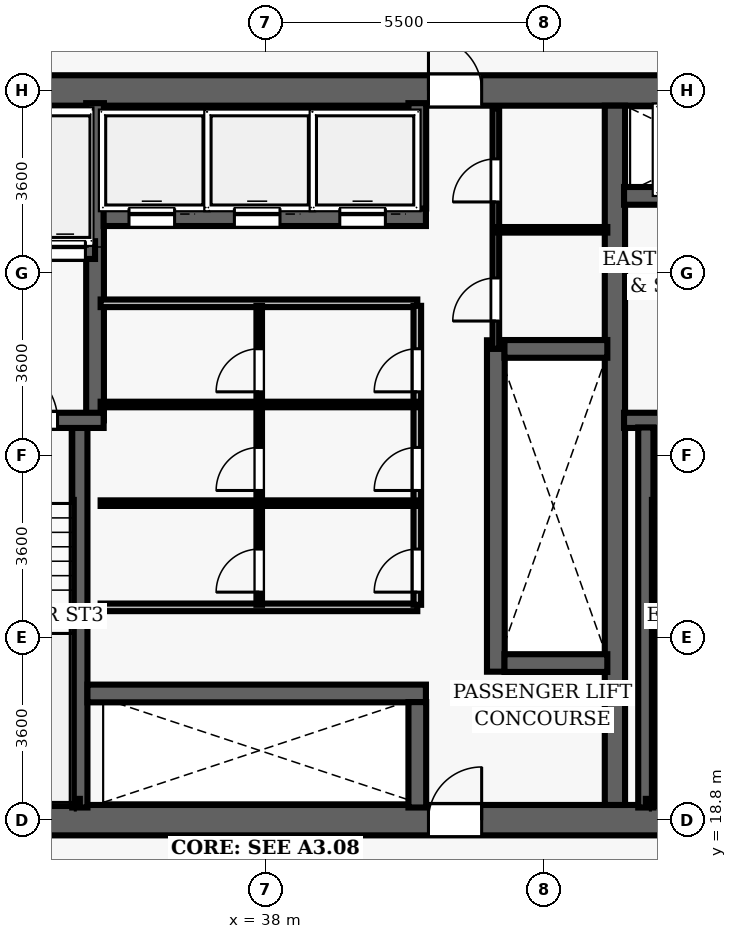
"""IFC4 building model, lengths in metres.
Left out: names, types, materials, properties, quantities, classifications, styles, units other than length and angle.
Written with IfcOpenShell. Run it as: python <this file> out.ifc"""

import sys

from ifc_helpers import new_model, si_unit, direction, frame, frame_2d, origin, place, context, subcontext, project, spatial, rectangle, extrude, element, fill, save


model = new_model("IFC4")
c1 = context("Model", 3, precision=1e-05, world=origin(), true_north=direction((0.0, 1.0)))
c2 = subcontext(c1, "Body", "Model", "MODEL_VIEW")
j1 = project(units=[si_unit("LENGTHUNIT", "METRE"), si_unit("PLANEANGLEUNIT", "RADIAN")], contexts=[c1])
p1 = place(None, origin())
s1 = spatial("IfcSite", under=j1, at=p1, CompositionType="ELEMENT")
p2 = place(p1, origin())
s2 = spatial("IfcBuilding", under=s1, at=p2, CompositionType="ELEMENT")
p3 = place(p2, frame((0.0, 0.0, 65.9)))
s3 = spatial("IfcBuildingStorey", under=s2, at=p3, CompositionType="ELEMENT", Elevation=65.9)
p4 = place(p3, frame((26.7, 18.8, 0.0), z_axis=(0.0, 0.0, 1.0), x_axis=(1.0, 0.0, 0.0)))
e1 = element("IfcWall", 1, at=p4, inside=s3, PredefinedType="SHEAR", context=c2, shape_type="SweptSolid", body=[
    extrude(rectangle(XDim=22.6, YDim=0.6, at=frame_2d((11.3, 0.0))), origin(), (0.0, 0.0, 1.0), 3.5),
])
p5 = place(p4, frame((14.52, 0.0, 0.0)))
e2 = element("IfcOpeningElement", 2, at=p5, cuts=e1, PredefinedType="OPENING", context=c2, shape_type="SweptSolid", body=[
    extrude(rectangle(XDim=1.05, YDim=2.15, at=frame_2d((0.525, 1.075))), frame((0.0, 0.31, 0.0), z_axis=(0.0, -1.0, 0.0), x_axis=(1.0, 0.0, 0.0)), (0.0, 0.0, 1.0), 0.62),
])
p6 = place(p3, frame((26.7, 33.2, 0.0), z_axis=(0.0, 0.0, 1.0), x_axis=(1.0, 0.0, 0.0)))
e3 = element("IfcWall", 3, at=p6, inside=s3, PredefinedType="SHEAR", context=c2, shape_type="SweptSolid", body=[
    extrude(rectangle(XDim=22.6, YDim=0.6, at=frame_2d((11.3, 0.0))), origin(), (0.0, 0.0, 1.0), 3.5),
])
p7 = place(p6, frame((4.62, 0.0, 0.0)))
e4 = element("IfcOpeningElement", 4, at=p7, cuts=e3, PredefinedType="OPENING", context=c2, shape_type="SweptSolid", body=[
    extrude(rectangle(XDim=1.05, YDim=2.15, at=frame_2d((0.525, 1.075))), frame((0.0, 0.31, 0.0), z_axis=(0.0, -1.0, 0.0), x_axis=(1.0, 0.0, 0.0)), (0.0, 0.0, 1.0), 0.62),
])
p8 = place(p6, frame((14.52, 0.0, 0.0)))
e5 = element("IfcOpeningElement", 5, at=p8, cuts=e3, PredefinedType="OPENING", context=c2, shape_type="SweptSolid", body=[
    extrude(rectangle(XDim=1.05, YDim=2.15, at=frame_2d((0.525, 1.075))), frame((0.0, 0.31, 0.0), z_axis=(0.0, -1.0, 0.0), x_axis=(1.0, 0.0, 0.0)), (0.0, 0.0, 1.0), 0.62),
])
p9 = place(p3, frame((44.9, 19.1, 0.0), z_axis=(0.0, 0.0, 1.0), x_axis=(0.0, 1.0, 0.0)))
e6 = element("IfcWall", 6, at=p9, inside=s3, PredefinedType="SHEAR", context=c2, shape_type="SweptSolid", body=[
    extrude(rectangle(XDim=13.8, YDim=0.4, at=frame_2d((6.9, 0.0))), origin(), (0.0, 0.0, 1.0), 3.5),
])
p10 = place(p3, frame((45.08, 26.69, 0.0), z_axis=(0.0, 0.0, 1.0), x_axis=(1.0, 0.0, 0.0)))
e7 = element("IfcWall", 7, at=p10, inside=s3, PredefinedType="SHEAR", context=c2, shape_type="SweptSolid", body=[
    extrude(rectangle(XDim=3.67, YDim=0.3, at=frame_2d((1.835, 0.0))), origin(), (0.0, 0.0, 1.0), 3.5),
])
p11 = place(p10, frame((1.05, 0.0, 0.0)))
e8 = element("IfcOpeningElement", 8, at=p11, cuts=e7, PredefinedType="OPENING", context=c2, shape_type="SweptSolid", body=[
    extrude(rectangle(XDim=1.1, YDim=2.15, at=frame_2d((0.55, 1.075))), frame((0.0, 0.16, 0.0), z_axis=(0.0, -1.0, 0.0), x_axis=(1.0, 0.0, 0.0)), (0.0, 0.0, 1.0), 0.32),
])
p12 = place(p3, frame((45.51, 19.05, 0.0), z_axis=(0.0, 0.0, 1.0), x_axis=(0.0, 1.0, 0.0)))
e9 = element("IfcWall", 9, at=p12, inside=s3, PredefinedType="SHEAR", context=c2, shape_type="SweptSolid", body=[
    extrude(rectangle(XDim=7.5, YDim=0.3, at=frame_2d((3.75, 0.0))), origin(), (0.0, 0.0, 1.0), 3.5),
])
p13 = place(p3, frame((45.51, 19.16, 0.0), z_axis=(0.0, 0.0, 1.0), x_axis=(1.0, 0.0, 0.0)))
e10 = element("IfcWall", 10, at=p13, inside=s3, PredefinedType="SHEAR", context=c2, shape_type="SweptSolid", body=[
    extrude(rectangle(XDim=3.095, YDim=0.12, at=frame_2d((1.547, 0.0))), origin(), (0.0, 0.0, 1.0), 3.5),
])
p14 = place(p3, frame((45.08, 31.12, 0.0), z_axis=(0.0, 0.0, 1.0), x_axis=(1.0, 0.0, 0.0)))
e11 = element("IfcWall", 11, at=p14, inside=s3, PredefinedType="SHEAR", context=c2, shape_type="SweptSolid", body=[
    extrude(rectangle(XDim=3.67, YDim=0.35, at=frame_2d((1.835, 0.0))), origin(), (0.0, 0.0, 1.0), 2.6),
])
p15 = place(p14, frame((1.25, 0.0, 0.0)))
e12 = element("IfcOpeningElement", 12, at=p15, cuts=e11, PredefinedType="OPENING", context=c2, shape_type="SweptSolid", body=[
    extrude(rectangle(XDim=1.1, YDim=2.15, at=frame_2d((0.55, 1.075))), frame((0.0, 0.185, 0.0), z_axis=(0.0, -1.0, 0.0), x_axis=(1.0, 0.0, 0.0)), (0.0, 0.0, 1.0), 0.37),
])
p16 = place(p3, frame((34.34, 19.05, 0.0), z_axis=(0.0, 0.0, 1.0), x_axis=(0.0, 1.0, 0.0)))
e13 = element("IfcWall", 13, at=p16, inside=s3, PredefinedType="SHEAR", context=c2, shape_type="SweptSolid", body=[
    extrude(rectangle(XDim=7.5, YDim=0.3, at=frame_2d((3.75, 0.0))), origin(), (0.0, 0.0, 1.0), 3.5),
])
p17 = place(p3, frame((34.64, 26.69, 0.0), z_axis=(0.0, 0.0, 1.0), x_axis=(0.0, 1.0, 0.0)))
e14 = element("IfcWall", 14, at=p17, inside=s3, PredefinedType="SHEAR", context=c2, shape_type="SweptSolid", body=[
    extrude(rectangle(XDim=6.26, YDim=0.35, at=frame_2d((3.13, 0.0))), origin(), (0.0, 0.0, 1.0), 3.5),
])
p18 = place(p3, frame((31.25, 26.69, 0.0), z_axis=(0.0, 0.0, 1.0), x_axis=(1.0, 0.0, 0.0)))
e15 = element("IfcWall", 15, at=p18, inside=s3, PredefinedType="SHEAR", context=c2, shape_type="SweptSolid", body=[
    extrude(rectangle(XDim=3.56, YDim=0.3, at=frame_2d((1.78, 0.0))), origin(), (0.0, 0.0, 1.0), 3.5),
])
p19 = place(p18, frame((1.55, 0.0, 0.0)))
e16 = element("IfcOpeningElement", 16, at=p19, cuts=e15, PredefinedType="OPENING", context=c2, shape_type="SweptSolid", body=[
    extrude(rectangle(XDim=1.1, YDim=2.15, at=frame_2d((0.55, 1.075))), frame((0.0, 0.16, 0.0), z_axis=(0.0, -1.0, 0.0), x_axis=(1.0, 0.0, 0.0)), (0.0, 0.0, 1.0), 0.32),
])
p20 = place(p3, frame((31.3, 19.16, 0.0), z_axis=(0.0, 0.0, 1.0), x_axis=(1.0, 0.0, 0.0)))
e17 = element("IfcWall", 17, at=p20, inside=s3, PredefinedType="SHEAR", context=c2, shape_type="SweptSolid", body=[
    extrude(rectangle(XDim=3.04, YDim=0.12, at=frame_2d((1.52, 0.0))), origin(), (0.0, 0.0, 1.0), 3.5),
])
p21 = place(p3, frame((32.23, 30.05, 0.0), z_axis=(0.0, 0.0, 1.0), x_axis=(1.0, 0.0, 0.0)))
e18 = element("IfcWall", 18, at=p21, inside=s3, PredefinedType="SHEAR", context=c2, shape_type="SweptSolid", body=[
    extrude(rectangle(XDim=2.41, YDim=0.35, at=frame_2d((1.205, 0.0))), origin(), (0.0, 0.0, 1.0), 2.6),
])
p22 = place(p21, frame((0.42, 0.0, 0.0)))
e19 = element("IfcOpeningElement", 19, at=p22, cuts=e18, PredefinedType="OPENING", context=c2, shape_type="SweptSolid", body=[
    extrude(rectangle(XDim=0.8, YDim=2.15, at=frame_2d((0.4, 1.075))), frame((0.0, 0.185, 0.0), z_axis=(0.0, -1.0, 0.0), x_axis=(1.0, 0.0, 0.0)), (0.0, 0.0, 1.0), 0.37),
])
p23 = place(p21, frame((1.42, 0.0, 0.0)))
e20 = element("IfcOpeningElement", 20, at=p23, cuts=e18, PredefinedType="OPENING", context=c2, shape_type="SweptSolid", body=[
    extrude(rectangle(XDim=0.8, YDim=2.15, at=frame_2d((0.4, 1.075))), frame((0.0, 0.185, 0.0), z_axis=(0.0, -1.0, 0.0), x_axis=(1.0, 0.0, 0.0)), (0.0, 0.0, 1.0), 0.37),
])
p24 = place(p3, frame((42.55, 21.73, 0.0), z_axis=(0.0, 0.0, 1.0), x_axis=(0.0, 1.0, 0.0)))
e21 = element("IfcWall", 21, at=p24, inside=s3, PredefinedType="SHEAR", context=c2, shape_type="SweptSolid", body=[
    extrude(rectangle(XDim=6.54, YDim=0.35, at=frame_2d((3.27, 0.0))), origin(), (0.0, 0.0, 1.0), 2.6),
])
for number, where, z_axis, x_axis in (
    (22, (42.72, 21.9, 0.0), (0.0, 0.0, 1.0), (1.0, 0.0, 0.0)),
    (23, (42.72, 28.1, 0.0), (0.0, 0.0, 1.0), (1.0, 0.0, 0.0)),
):
    element("IfcWall", number, at=place(p3, frame(where, z_axis=z_axis, x_axis=x_axis)), inside=s3, PredefinedType="SHEAR", context=c2, shape_type="SweptSolid", body=[
        extrude(rectangle(XDim=2.03, YDim=0.35, at=frame_2d((1.015, 0.0))), origin(), (0.0, 0.0, 1.0), 2.6),
    ])
p25 = place(p3, frame((34.81, 30.7, 0.0), z_axis=(0.0, 0.0, 1.0), x_axis=(1.0, 0.0, 0.0)))
e24 = element("IfcWall", 24, at=p25, inside=s3, PredefinedType="SHEAR", context=c2, shape_type="SweptSolid", body=[
    extrude(rectangle(XDim=6.36, YDim=0.35, at=frame_2d((3.18, 0.0))), origin(), (0.0, 0.0, 1.0), 2.6),
])
p26 = place(p25, frame((0.5, 0.0, 0.0)))
e25 = element("IfcOpeningElement", 25, at=p26, cuts=e24, PredefinedType="OPENING", context=c2, shape_type="SweptSolid", body=[
    extrude(rectangle(XDim=0.9, YDim=2.15, at=frame_2d((0.45, 1.075))), frame((0.0, 0.185, 0.0), z_axis=(0.0, -1.0, 0.0), x_axis=(1.0, 0.0, 0.0)), (0.0, 0.0, 1.0), 0.37),
])
p27 = place(p25, frame((2.58, 0.0, 0.0)))
e26 = element("IfcOpeningElement", 26, at=p27, cuts=e24, PredefinedType="OPENING", context=c2, shape_type="SweptSolid", body=[
    extrude(rectangle(XDim=0.9, YDim=2.15, at=frame_2d((0.45, 1.075))), frame((0.0, 0.185, 0.0), z_axis=(0.0, -1.0, 0.0), x_axis=(1.0, 0.0, 0.0)), (0.0, 0.0, 1.0), 0.37),
])
p28 = place(p25, frame((4.66, 0.0, 0.0)))
e27 = element("IfcOpeningElement", 27, at=p28, cuts=e24, PredefinedType="OPENING", context=c2, shape_type="SweptSolid", body=[
    extrude(rectangle(XDim=0.9, YDim=2.15, at=frame_2d((0.45, 1.075))), frame((0.0, 0.185, 0.0), z_axis=(0.0, -1.0, 0.0), x_axis=(1.0, 0.0, 0.0)), (0.0, 0.0, 1.0), 0.37),
])
p29 = place(p3, frame((41.0, 30.87, 0.0), z_axis=(0.0, 0.0, 1.0), x_axis=(0.0, 1.0, 0.0)))
e28 = element("IfcWall", 28, at=p29, inside=s3, PredefinedType="SHEAR", context=c2, shape_type="SweptSolid", body=[
    extrude(rectangle(XDim=2.08, YDim=0.35, at=frame_2d((1.04, 0.0))), origin(), (0.0, 0.0, 1.0), 2.6),
])
p30 = place(p3, frame((34.49, 21.3, 0.0), z_axis=(0.0, 0.0, 1.0), x_axis=(1.0, 0.0, 0.0)))
e29 = element("IfcWall", 29, at=p30, inside=s3, PredefinedType="SHEAR", context=c2, shape_type="SweptSolid", body=[
    extrude(rectangle(XDim=6.68, YDim=0.35, at=frame_2d((3.34, 0.0))), origin(), (0.0, 0.0, 1.0), 2.6),
])
p31 = place(p3, frame((41.0, 19.05, 0.0), z_axis=(0.0, 0.0, 1.0), x_axis=(0.0, 1.0, 0.0)))
e30 = element("IfcWall", 30, at=p31, inside=s3, PredefinedType="SHEAR", context=c2, shape_type="SweptSolid", body=[
    extrude(rectangle(XDim=2.08, YDim=0.35, at=frame_2d((1.04, 0.0))), origin(), (0.0, 0.0, 1.0), 2.6),
])
for number, where, z_axis, x_axis in (
    (31, (34.75, 29.0, 0.0), (0.0, 0.0, 1.0), (1.0, 0.0, 0.0)),
    (32, (34.75, 23.0, 0.0), (0.0, 0.0, 1.0), (1.0, 0.0, 0.0)),
):
    element("IfcWall", number, at=place(p3, frame(where, z_axis=z_axis, x_axis=x_axis)), inside=s3, PredefinedType="PARTITIONING", context=c2, shape_type="SweptSolid", body=[
        extrude(rectangle(XDim=6.25, YDim=0.15, at=frame_2d((3.125, 0.0))), origin(), (0.0, 0.0, 1.0), 2.6),
    ])
p32 = place(p3, frame((41.0, 23.05, 0.0), z_axis=(0.0, 0.0, 1.0), x_axis=(0.0, 1.0, 0.0)))
e33 = element("IfcWall", 33, at=p32, inside=s3, PredefinedType="PARTITIONING", context=c2, shape_type="SweptSolid", body=[
    extrude(rectangle(XDim=5.9, YDim=0.15, at=frame_2d((2.95, 0.0))), origin(), (0.0, 0.0, 1.0), 2.6),
])
p33 = place(p32, frame((0.25, 0.0, 0.0)))
e34 = element("IfcOpeningElement", 34, at=p33, cuts=e33, PredefinedType="OPENING", context=c2, shape_type="SweptSolid", body=[
    extrude(rectangle(XDim=0.85, YDim=2.1, at=frame_2d((0.425, 1.05))), frame((0.0, 0.085, 0.0), z_axis=(0.0, -1.0, 0.0), x_axis=(1.0, 0.0, 0.0)), (0.0, 0.0, 1.0), 0.17),
])
p34 = place(p32, frame((2.256, 0.0, 0.0)))
e35 = element("IfcOpeningElement", 35, at=p34, cuts=e33, PredefinedType="OPENING", context=c2, shape_type="SweptSolid", body=[
    extrude(rectangle(XDim=0.85, YDim=2.1, at=frame_2d((0.425, 1.05))), frame((0.0, 0.085, 0.0), z_axis=(0.0, -1.0, 0.0), x_axis=(1.0, 0.0, 0.0)), (0.0, 0.0, 1.0), 0.17),
])
p35 = place(p32, frame((4.203, 0.0, 0.0)))
e36 = element("IfcOpeningElement", 36, at=p35, cuts=e33, PredefinedType="OPENING", context=c2, shape_type="SweptSolid", body=[
    extrude(rectangle(XDim=0.85, YDim=2.1, at=frame_2d((0.425, 1.05))), frame((0.0, 0.085, 0.0), z_axis=(0.0, -1.0, 0.0), x_axis=(1.0, 0.0, 0.0)), (0.0, 0.0, 1.0), 0.17),
])
p36 = place(p3, frame((37.88, 23.05, 0.0), z_axis=(0.0, 0.0, 1.0), x_axis=(0.0, 1.0, 0.0)))
e37 = element("IfcWall", 37, at=p36, inside=s3, PredefinedType="PARTITIONING", context=c2, shape_type="SweptSolid", body=[
    extrude(rectangle(XDim=5.9, YDim=0.11, at=frame_2d((2.95, 0.0))), origin(), (0.0, 0.0, 1.0), 2.6),
])
p37 = place(p36, frame((0.25, 0.0, 0.0)))
e38 = element("IfcOpeningElement", 38, at=p37, cuts=e37, PredefinedType="OPENING", context=c2, shape_type="SweptSolid", body=[
    extrude(rectangle(XDim=0.85, YDim=2.1, at=frame_2d((0.425, 1.05))), frame((0.0, 0.065, 0.0), z_axis=(0.0, -1.0, 0.0), x_axis=(1.0, 0.0, 0.0)), (0.0, 0.0, 1.0), 0.13),
])
p38 = place(p36, frame((2.256, 0.0, 0.0)))
e39 = element("IfcOpeningElement", 39, at=p38, cuts=e37, PredefinedType="OPENING", context=c2, shape_type="SweptSolid", body=[
    extrude(rectangle(XDim=0.85, YDim=2.1, at=frame_2d((0.425, 1.05))), frame((0.0, 0.065, 0.0), z_axis=(0.0, -1.0, 0.0), x_axis=(1.0, 0.0, 0.0)), (0.0, 0.0, 1.0), 0.13),
])
p39 = place(p36, frame((4.203, 0.0, 0.0)))
e40 = element("IfcOpeningElement", 40, at=p39, cuts=e37, PredefinedType="OPENING", context=c2, shape_type="SweptSolid", body=[
    extrude(rectangle(XDim=0.85, YDim=2.1, at=frame_2d((0.425, 1.05))), frame((0.0, 0.065, 0.0), z_axis=(0.0, -1.0, 0.0), x_axis=(1.0, 0.0, 0.0)), (0.0, 0.0, 1.0), 0.13),
])
for number, where, z_axis, x_axis in (
    (41, (34.75, 25.056, 0.0), (0.0, 0.0, 1.0), (1.0, 0.0, 0.0)),
    (42, (34.75, 27.003, 0.0), (0.0, 0.0, 1.0), (1.0, 0.0, 0.0)),
):
    element("IfcWall", number, at=place(p3, frame(where, z_axis=z_axis, x_axis=x_axis)), inside=s3, PredefinedType="PARTITIONING", context=c2, shape_type="SweptSolid", body=[
        extrude(rectangle(XDim=6.25, YDim=0.11, at=frame_2d((3.125, 0.0))), origin(), (0.0, 0.0, 1.0), 2.6),
    ])
p40 = place(p3, frame((42.55, 28.1, 0.0), z_axis=(0.0, 0.0, 1.0), x_axis=(0.0, 1.0, 0.0)))
e43 = element("IfcWall", 43, at=p40, inside=s3, PredefinedType="PARTITIONING", context=c2, shape_type="SweptSolid", body=[
    extrude(rectangle(XDim=4.75, YDim=0.13, at=frame_2d((2.375, 0.0))), origin(), (0.0, 0.0, 1.0), 2.6),
])
p41 = place(p40, frame((0.55, 0.0, 0.0)))
e44 = element("IfcOpeningElement", 44, at=p41, cuts=e43, PredefinedType="OPENING", context=c2, shape_type="SweptSolid", body=[
    extrude(rectangle(XDim=0.85, YDim=2.1, at=frame_2d((0.425, 1.05))), frame((0.0, 0.075, 0.0), z_axis=(0.0, -1.0, 0.0), x_axis=(1.0, 0.0, 0.0)), (0.0, 0.0, 1.0), 0.15),
])
p42 = place(p40, frame((2.9, 0.0, 0.0)))
e45 = element("IfcOpeningElement", 45, at=p42, cuts=e43, PredefinedType="OPENING", context=c2, shape_type="SweptSolid", body=[
    extrude(rectangle(XDim=0.85, YDim=2.1, at=frame_2d((0.425, 1.05))), frame((0.0, 0.075, 0.0), z_axis=(0.0, -1.0, 0.0), x_axis=(1.0, 0.0, 0.0)), (0.0, 0.0, 1.0), 0.15),
])
p43 = place(p3, frame((42.55, 30.45, 0.0), z_axis=(0.0, 0.0, 1.0), x_axis=(1.0, 0.0, 0.0)))
e46 = element("IfcWall", 46, at=p43, inside=s3, PredefinedType="PARTITIONING", context=c2, shape_type="SweptSolid", body=[
    extrude(rectangle(XDim=2.2, YDim=0.11, at=frame_2d((1.1, 0.0))), origin(), (0.0, 0.0, 1.0), 2.6),
])
p44 = place(p19, origin())
e47 = element("IfcDoor", 47, at=p44, inside=s3, OperationType="SINGLE_SWING_LEFT", PredefinedType="DOOR", context=c2, shape_type="SweptSolid", body=[
    extrude(rectangle(XDim=1.1, YDim=2.15, at=frame_2d((0.55, 1.075))), frame((0.0, 0.025, 0.0), z_axis=(0.0, -1.0, 0.0), x_axis=(1.0, 0.0, 0.0)), (0.0, 0.0, 1.0), 0.05),
])
fill(e16, e47)
p45 = place(p8, origin())
e48 = element("IfcDoor", 48, at=p45, inside=s3, OperationType="SINGLE_SWING_LEFT", PredefinedType="DOOR", context=c2, shape_type="SweptSolid", body=[
    extrude(rectangle(XDim=1.05, YDim=2.15, at=frame_2d((0.525, 1.075))), frame((0.0, 0.025, 0.0), z_axis=(0.0, -1.0, 0.0), x_axis=(1.0, 0.0, 0.0)), (0.0, 0.0, 1.0), 0.05),
])
fill(e5, e48)
p46 = place(p5, origin())
e49 = element("IfcDoor", 49, at=p46, inside=s3, OperationType="SINGLE_SWING_RIGHT", PredefinedType="DOOR", context=c2, shape_type="SweptSolid", body=[
    extrude(rectangle(XDim=1.05, YDim=2.15, at=frame_2d((0.525, 1.075))), frame((0.0, 0.025, 0.0), z_axis=(0.0, -1.0, 0.0), x_axis=(1.0, 0.0, 0.0)), (0.0, 0.0, 1.0), 0.05),
])
fill(e2, e49)
p47 = place(p33, origin())
e50 = element("IfcDoor", 50, at=p47, inside=s3, OperationType="SINGLE_SWING_LEFT", PredefinedType="DOOR", context=c2, shape_type="SweptSolid", body=[
    extrude(rectangle(XDim=0.85, YDim=2.1, at=frame_2d((0.425, 1.05))), frame((0.0, 0.025, 0.0), z_axis=(0.0, -1.0, 0.0), x_axis=(1.0, 0.0, 0.0)), (0.0, 0.0, 1.0), 0.05),
])
fill(e34, e50)
p48 = place(p37, origin())
e51 = element("IfcDoor", 51, at=p48, inside=s3, OperationType="SINGLE_SWING_LEFT", PredefinedType="DOOR", context=c2, shape_type="SweptSolid", body=[
    extrude(rectangle(XDim=0.85, YDim=2.1, at=frame_2d((0.425, 1.05))), frame((0.0, 0.025, 0.0), z_axis=(0.0, -1.0, 0.0), x_axis=(1.0, 0.0, 0.0)), (0.0, 0.0, 1.0), 0.05),
])
fill(e38, e51)
p49 = place(p34, origin())
e52 = element("IfcDoor", 52, at=p49, inside=s3, OperationType="SINGLE_SWING_LEFT", PredefinedType="DOOR", context=c2, shape_type="SweptSolid", body=[
    extrude(rectangle(XDim=0.85, YDim=2.1, at=frame_2d((0.425, 1.05))), frame((0.0, 0.025, 0.0), z_axis=(0.0, -1.0, 0.0), x_axis=(1.0, 0.0, 0.0)), (0.0, 0.0, 1.0), 0.05),
])
fill(e35, e52)
p50 = place(p38, origin())
e53 = element("IfcDoor", 53, at=p50, inside=s3, OperationType="SINGLE_SWING_LEFT", PredefinedType="DOOR", context=c2, shape_type="SweptSolid", body=[
    extrude(rectangle(XDim=0.85, YDim=2.1, at=frame_2d((0.425, 1.05))), frame((0.0, 0.025, 0.0), z_axis=(0.0, -1.0, 0.0), x_axis=(1.0, 0.0, 0.0)), (0.0, 0.0, 1.0), 0.05),
])
fill(e39, e53)
p51 = place(p35, origin())
e54 = element("IfcDoor", 54, at=p51, inside=s3, OperationType="SINGLE_SWING_LEFT", PredefinedType="DOOR", context=c2, shape_type="SweptSolid", body=[
    extrude(rectangle(XDim=0.85, YDim=2.1, at=frame_2d((0.425, 1.05))), frame((0.0, 0.025, 0.0), z_axis=(0.0, -1.0, 0.0), x_axis=(1.0, 0.0, 0.0)), (0.0, 0.0, 1.0), 0.05),
])
fill(e36, e54)
p52 = place(p39, origin())
e55 = element("IfcDoor", 55, at=p52, inside=s3, OperationType="SINGLE_SWING_LEFT", PredefinedType="DOOR", context=c2, shape_type="SweptSolid", body=[
    extrude(rectangle(XDim=0.85, YDim=2.1, at=frame_2d((0.425, 1.05))), frame((0.0, 0.025, 0.0), z_axis=(0.0, -1.0, 0.0), x_axis=(1.0, 0.0, 0.0)), (0.0, 0.0, 1.0), 0.05),
])
fill(e40, e55)
p53 = place(p41, origin())
e56 = element("IfcDoor", 56, at=p53, inside=s3, OperationType="SINGLE_SWING_LEFT", PredefinedType="DOOR", context=c2, shape_type="SweptSolid", body=[
    extrude(rectangle(XDim=0.85, YDim=2.1, at=frame_2d((0.425, 1.05))), frame((0.0, 0.025, 0.0), z_axis=(0.0, -1.0, 0.0), x_axis=(1.0, 0.0, 0.0)), (0.0, 0.0, 1.0), 0.05),
])
fill(e44, e56)
p54 = place(p42, origin())
e57 = element("IfcDoor", 57, at=p54, inside=s3, OperationType="SINGLE_SWING_LEFT", PredefinedType="DOOR", context=c2, shape_type="SweptSolid", body=[
    extrude(rectangle(XDim=0.85, YDim=2.1, at=frame_2d((0.425, 1.05))), frame((0.0, 0.025, 0.0), z_axis=(0.0, -1.0, 0.0), x_axis=(1.0, 0.0, 0.0)), (0.0, 0.0, 1.0), 0.05),
])
fill(e45, e57)
p55 = place(p26, origin())
e58 = element("IfcDoor", 58, at=p55, inside=s3, OperationType="SLIDING_TO_LEFT", PredefinedType="DOOR", context=c2, shape_type="SweptSolid", body=[
    extrude(rectangle(XDim=0.9, YDim=2.15, at=frame_2d((0.45, 1.075))), frame((0.0, 0.025, 0.0), z_axis=(0.0, -1.0, 0.0), x_axis=(1.0, 0.0, 0.0)), (0.0, 0.0, 1.0), 0.05),
])
fill(e25, e58)
p56 = place(p27, origin())
e59 = element("IfcDoor", 59, at=p56, inside=s3, OperationType="SLIDING_TO_LEFT", PredefinedType="DOOR", context=c2, shape_type="SweptSolid", body=[
    extrude(rectangle(XDim=0.9, YDim=2.15, at=frame_2d((0.45, 1.075))), frame((0.0, 0.025, 0.0), z_axis=(0.0, -1.0, 0.0), x_axis=(1.0, 0.0, 0.0)), (0.0, 0.0, 1.0), 0.05),
])
fill(e26, e59)
p57 = place(p28, origin())
e60 = element("IfcDoor", 60, at=p57, inside=s3, OperationType="SLIDING_TO_LEFT", PredefinedType="DOOR", context=c2, shape_type="SweptSolid", body=[
    extrude(rectangle(XDim=0.9, YDim=2.15, at=frame_2d((0.45, 1.075))), frame((0.0, 0.025, 0.0), z_axis=(0.0, -1.0, 0.0), x_axis=(1.0, 0.0, 0.0)), (0.0, 0.0, 1.0), 0.05),
])
fill(e27, e60)
p58 = place(p23, origin())
e61 = element("IfcDoor", 61, at=p58, inside=s3, OperationType="SLIDING_TO_LEFT", PredefinedType="DOOR", context=c2, shape_type="SweptSolid", body=[
    extrude(rectangle(XDim=0.8, YDim=2.15, at=frame_2d((0.4, 1.075))), frame((0.0, 0.025, 0.0), z_axis=(0.0, -1.0, 0.0), x_axis=(1.0, 0.0, 0.0)), (0.0, 0.0, 1.0), 0.05),
])
fill(e20, e61)
save(model, sys.argv[1])
